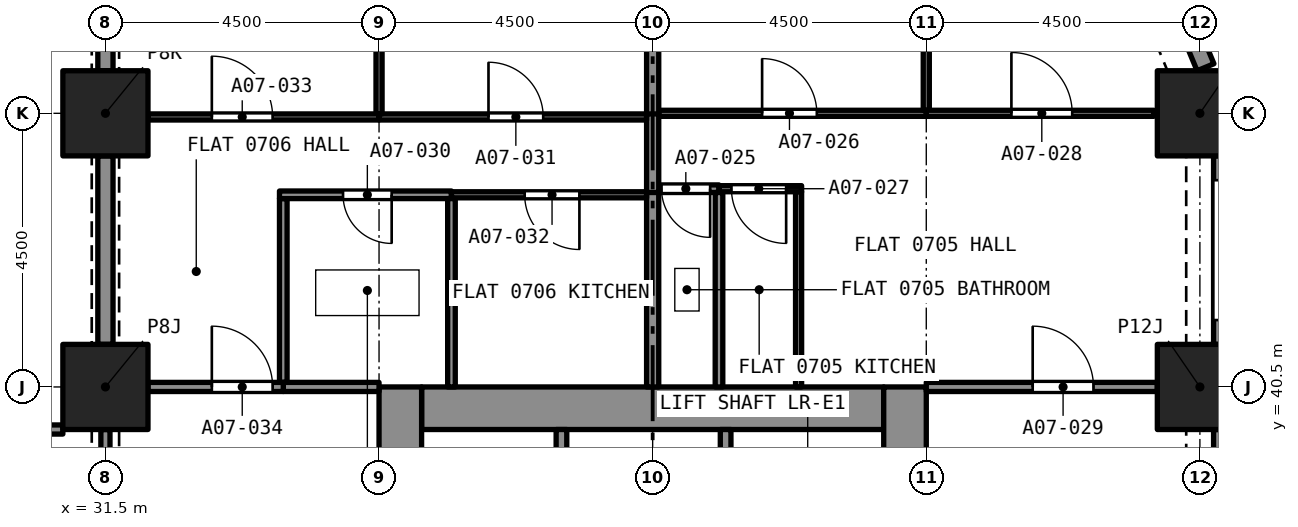
"""IFC4 building model, lengths in metres.
Left out: names, types, materials, properties, quantities, classifications, styles, units other than length and angle.
Written with IfcOpenShell. Run it as: python <this file> out.ifc"""

import sys

from ifc_helpers import new_model, si_unit, direction, frame, frame_2d, origin, origin_2d, place, context, subcontext, project, spatial, rectangle, extrude, element, fill, save


model = new_model("IFC4")
c1 = context("Model", 3, precision=1e-05, world=origin(), true_north=direction((0.0, 1.0)))
c2 = subcontext(c1, "Body", "Model", "MODEL_VIEW")
j1 = project(units=[si_unit("LENGTHUNIT", "METRE"), si_unit("PLANEANGLEUNIT", "RADIAN")], contexts=[c1])
p1 = place(None, origin())
s1 = spatial("IfcSite", under=j1, at=p1, CompositionType="ELEMENT")
p2 = place(p1, origin())
s2 = spatial("IfcBuilding", under=s1, at=p2, CompositionType="ELEMENT")
p3 = place(p2, frame((0.0, 0.0, 33.6)))
s3 = spatial("IfcBuildingStorey", under=s2, at=p3, CompositionType="ELEMENT", Elevation=33.6)
for number, where, z_axis, x_axis in (
    (1, (31.5, 40.5, 0.0), (0.0, 0.0, 1.0), (1.0, 0.0, 0.0)),
    (2, (49.5, 40.5, 0.0), (0.0, 0.0, 1.0), (1.0, 0.0, 0.0)),
    (3, (31.5, 45.0, 0.0), (0.0, 0.0, 1.0), (1.0, 0.0, 0.0)),
    (4, (49.5, 45.0, 0.0), (0.0, 0.0, 1.0), (1.0, 0.0, 0.0)),
):
    element("IfcColumn", number, at=place(p3, frame(where, z_axis=z_axis, x_axis=x_axis)), inside=s3, PredefinedType="COLUMN", context=c2, shape_type="SweptSolid", body=[
        extrude(rectangle(XDim=1.4, YDim=1.4, at=origin_2d()), origin(), (0.0, 0.0, 1.0), 3.2),
    ])
p4 = place(p3, frame((36.7, 40.15, 0.0), z_axis=(0.0, 0.0, 1.0), x_axis=(1.0, 0.0, 0.0)))
e5 = element("IfcWall", 5, at=p4, inside=s3, PredefinedType="SOLIDWALL", context=c2, shape_type="SweptSolid", body=[
    extrude(rectangle(XDim=7.6, YDim=0.7, at=frame_2d((3.8, 0.0))), origin(), (0.0, 0.0, 1.0), 3.2),
])
p5 = place(p3, frame((36.35, 27.0, 0.0), z_axis=(0.0, 0.0, 1.0), x_axis=(0.0, 1.0, 0.0)))
e6 = element("IfcWall", 6, at=p5, inside=s3, PredefinedType="SOLIDWALL", context=c2, shape_type="SweptSolid", body=[
    extrude(rectangle(XDim=13.5, YDim=0.7, at=frame_2d((6.75, 0.0))), origin(), (0.0, 0.0, 1.0), 3.2),
])
p6 = place(p5, frame((8.95, 0.0, 0.0)))
e7 = element("IfcOpeningElement", 7, at=p6, cuts=e6, PredefinedType="OPENING", context=c2, shape_type="SweptSolid", body=[
    extrude(rectangle(XDim=1.2, YDim=2.1, at=frame_2d((0.6, 1.05))), frame((0.0, 0.36, 0.0), z_axis=(0.0, -1.0, 0.0), x_axis=(1.0, 0.0, 0.0)), (0.0, 0.0, 1.0), 0.72),
])
p7 = place(p3, frame((44.65, 27.0, 0.0), z_axis=(0.0, 0.0, 1.0), x_axis=(0.0, 1.0, 0.0)))
e8 = element("IfcWall", 8, at=p7, inside=s3, PredefinedType="SOLIDWALL", context=c2, shape_type="SweptSolid", body=[
    extrude(rectangle(XDim=13.5, YDim=0.7, at=frame_2d((6.75, 0.0))), origin(), (0.0, 0.0, 1.0), 3.2),
])
p8 = place(p7, frame((8.95, 0.0, 0.0)))
e9 = element("IfcOpeningElement", 9, at=p8, cuts=e8, PredefinedType="OPENING", context=c2, shape_type="SweptSolid", body=[
    extrude(rectangle(XDim=1.2, YDim=2.1, at=frame_2d((0.6, 1.05))), frame((0.0, 0.36, 0.0), z_axis=(0.0, -1.0, 0.0), x_axis=(1.0, 0.0, 0.0)), (0.0, 0.0, 1.0), 0.72),
])
p9 = place(p3, frame((49.875, 39.8, 0.0), z_axis=(0.0, 0.0, 1.0), x_axis=(0.0, -1.0, 0.0)))
e10 = element("IfcWall", 10, at=p9, inside=s3, PredefinedType="SOLIDWALL", context=c2, shape_type="SweptSolid", body=[
    extrude(rectangle(XDim=3.1, YDim=0.3, at=frame_2d((1.55, 0.0))), origin(), (0.0, 0.0, 1.0), 3.2),
])
p10 = place(p9, frame((0.4, 0.0, 0.45)))
e11 = element("IfcOpeningElement", 11, at=p10, cuts=e10, PredefinedType="OPENING", context=c2, shape_type="SweptSolid", body=[
    extrude(rectangle(XDim=2.3, YDim=1.95, at=frame_2d((1.15, 0.975))), frame((0.0, 0.16, 0.0), z_axis=(0.0, -1.0, 0.0), x_axis=(1.0, 0.0, 0.0)), (0.0, 0.0, 1.0), 0.32),
])
p11 = place(p3, frame((49.875, 44.3, 0.0), z_axis=(0.0, 0.0, 1.0), x_axis=(0.0, -1.0, 0.0)))
e12 = element("IfcWall", 12, at=p11, inside=s3, PredefinedType="SOLIDWALL", context=c2, shape_type="SweptSolid", body=[
    extrude(rectangle(XDim=3.1, YDim=0.3, at=frame_2d((1.55, 0.0))), origin(), (0.0, 0.0, 1.0), 3.2),
])
p12 = place(p11, frame((0.4, 0.0, 0.45)))
e13 = element("IfcOpeningElement", 13, at=p12, cuts=e12, PredefinedType="OPENING", context=c2, shape_type="SweptSolid", body=[
    extrude(rectangle(XDim=2.3, YDim=1.95, at=frame_2d((1.15, 0.975))), frame((0.0, 0.16, 0.0), z_axis=(0.0, -1.0, 0.0), x_axis=(1.0, 0.0, 0.0)), (0.0, 0.0, 1.0), 0.32),
])
p13 = place(p3, frame((48.878, 47.48, 0.0), z_axis=(0.0, 0.0, 1.0), x_axis=(0.38262540684, -0.923903565336, 0.0)))
e14 = element("IfcWall", 14, at=p13, inside=s3, PredefinedType="SOLIDWALL", context=c2, shape_type="SweptSolid", body=[
    extrude(rectangle(XDim=1.865, YDim=0.3, at=frame_2d((0.933, 0.0))), origin(), (0.0, 0.0, 1.0), 3.2),
])
p14 = place(p13, frame((0.258, 0.0, 0.45)))
e15 = element("IfcOpeningElement", 15, at=p14, cuts=e14, PredefinedType="OPENING", context=c2, shape_type="SweptSolid", body=[
    extrude(rectangle(XDim=1.1, YDim=1.95, at=frame_2d((0.55, 0.975))), frame((0.0, 0.16, 0.0), z_axis=(0.0, -1.0, 0.0), x_axis=(1.0, 0.0, 0.0)), (0.0, 0.0, 1.0), 0.32),
])
p15 = place(p3, frame((41.591, 43.76, 0.0), z_axis=(0.0, 0.0, 1.0), x_axis=(-1.0, 0.0, 0.0)))
e16 = element("IfcWall", 16, at=p15, inside=s3, PredefinedType="PARTITIONING", context=c2, shape_type="SweptSolid", body=[
    extrude(rectangle(XDim=0.991, YDim=0.125, at=frame_2d((0.495, 0.0))), origin(), (0.0, 0.0, 1.0), 2.9),
])
p16 = place(p15, frame((0.146, 0.0, 0.0)))
e17 = element("IfcOpeningElement", 17, at=p16, cuts=e16, PredefinedType="OPENING", context=c2, shape_type="SweptSolid", body=[
    extrude(rectangle(XDim=0.8, YDim=2.1, at=frame_2d((0.4, 1.05))), frame((0.0, 0.073, 0.0), z_axis=(0.0, -1.0, 0.0), x_axis=(1.0, 0.0, 0.0)), (0.0, 0.0, 1.0), 0.145),
])
p17 = place(p3, frame((41.591, 40.5, 0.0), z_axis=(0.0, 0.0, 1.0), x_axis=(0.0, 1.0, 0.0)))
e18 = element("IfcWall", 18, at=p17, inside=s3, PredefinedType="PARTITIONING", context=c2, shape_type="SweptSolid", body=[
    extrude(rectangle(XDim=3.198, YDim=0.125, at=frame_2d((1.599, 0.0))), origin(), (0.0, 0.0, 1.0), 2.9),
])
p18 = place(p3, frame((40.5, 40.5, 0.0), z_axis=(0.0, 0.0, 1.0), x_axis=(0.0, 1.0, 0.0)))
e19 = element("IfcWall", 19, at=p18, inside=s3, PredefinedType="PARTITIONING", context=c2, shape_type="SweptSolid", body=[
    extrude(rectangle(XDim=3.21, YDim=0.2, at=frame_2d((1.605, 0.0))), origin(), (0.0, 0.0, 1.0), 2.9),
])
p19 = place(p3, frame((40.6, 45.0, 0.0), z_axis=(0.0, 0.0, 1.0), x_axis=(1.0, 0.0, 0.0)))
e20 = element("IfcWall", 20, at=p19, inside=s3, PredefinedType="PARTITIONING", context=c2, shape_type="SweptSolid", body=[
    extrude(rectangle(XDim=4.4, YDim=0.1, at=frame_2d((2.2, 0.0))), origin(), (0.0, 0.0, 1.0), 2.9),
])
p20 = place(p19, frame((1.7, 0.0, 0.0)))
e21 = element("IfcOpeningElement", 21, at=p20, cuts=e20, PredefinedType="OPENING", context=c2, shape_type="SweptSolid", body=[
    extrude(rectangle(XDim=0.9, YDim=2.1, at=frame_2d((0.45, 1.05))), frame((0.0, 0.06, 0.0), z_axis=(0.0, -1.0, 0.0), x_axis=(1.0, 0.0, 0.0)), (0.0, 0.0, 1.0), 0.12),
])
p21 = place(p3, frame((45.0, 45.05, 0.0), z_axis=(0.0, 0.0, 1.0), x_axis=(0.0, 1.0, 0.0)))
e22 = element("IfcWall", 22, at=p21, inside=s3, PredefinedType="PARTITIONING", context=c2, shape_type="SweptSolid", body=[
    extrude(rectangle(XDim=3.692, YDim=0.1, at=frame_2d((1.846, 0.0))), origin(), (0.0, 0.0, 1.0), 2.9),
])
p22 = place(p3, frame((40.5, 44.95, 0.0), z_axis=(0.0, 0.0, 1.0), x_axis=(0.0, 1.0, 0.0)))
e23 = element("IfcWall", 23, at=p22, inside=s3, PredefinedType="PARTITIONING", context=c2, shape_type="SweptSolid", body=[
    extrude(rectangle(XDim=3.85, YDim=0.2, at=frame_2d((1.925, 0.0))), origin(), (0.0, 0.0, 1.0), 2.9),
])
p23 = place(p3, frame((42.9, 40.5, 0.0), z_axis=(0.0, 0.0, 1.0), x_axis=(0.0, 1.0, 0.0)))
e24 = element("IfcWall", 24, at=p23, inside=s3, PredefinedType="PARTITIONING", context=c2, shape_type="SweptSolid", body=[
    extrude(rectangle(XDim=3.21, YDim=0.1, at=frame_2d((1.605, 0.0))), origin(), (0.0, 0.0, 1.0), 2.9),
])
p24 = place(p3, frame((42.95, 43.76, 0.0), z_axis=(0.0, 0.0, 1.0), x_axis=(-1.0, 0.0, 0.0)))
e25 = element("IfcWall", 25, at=p24, inside=s3, PredefinedType="PARTITIONING", context=c2, shape_type="SweptSolid", body=[
    extrude(rectangle(XDim=1.359, YDim=0.1, at=frame_2d((0.68, 0.0))), origin(), (0.0, 0.0, 1.0), 2.9),
])
p25 = place(p24, frame((0.254, 0.0, 0.0)))
e26 = element("IfcOpeningElement", 26, at=p25, cuts=e25, PredefinedType="OPENING", context=c2, shape_type="SweptSolid", body=[
    extrude(rectangle(XDim=0.9, YDim=2.1, at=frame_2d((0.45, 1.05))), frame((0.0, 0.06, 0.0), z_axis=(0.0, -1.0, 0.0), x_axis=(1.0, 0.0, 0.0)), (0.0, 0.0, 1.0), 0.12),
])
p26 = place(p3, frame((45.0, 45.0, 0.0), z_axis=(0.0, 0.0, 1.0), x_axis=(1.0, 0.0, 0.0)))
e27 = element("IfcWall", 27, at=p26, inside=s3, PredefinedType="PARTITIONING", context=c2, shape_type="SweptSolid", body=[
    extrude(rectangle(XDim=3.742, YDim=0.1, at=frame_2d((1.871, 0.0))), origin(), (0.0, 0.0, 1.0), 2.9),
])
p27 = place(p26, frame((1.4, 0.0, 0.0)))
e28 = element("IfcOpeningElement", 28, at=p27, cuts=e27, PredefinedType="OPENING", context=c2, shape_type="SweptSolid", body=[
    extrude(rectangle(XDim=1.0, YDim=2.1, at=frame_2d((0.5, 1.05))), frame((0.0, 0.06, 0.0), z_axis=(0.0, -1.0, 0.0), x_axis=(1.0, 0.0, 0.0)), (0.0, 0.0, 1.0), 0.12),
])
p28 = place(p3, frame((40.5, 43.698, 0.0), z_axis=(0.0, 0.0, 1.0), x_axis=(0.0, 1.0, 0.0)))
e29 = element("IfcWall", 29, at=p28, inside=s3, PredefinedType="PARTITIONING", context=c2, shape_type="SweptSolid", body=[
    extrude(rectangle(XDim=1.292, YDim=0.2, at=frame_2d((0.646, 0.0))), origin(), (0.0, 0.0, 1.0), 2.9),
])
p29 = place(p3, frame((45.0, 40.5, 0.0), z_axis=(0.0, 0.0, 1.0), x_axis=(1.0, 0.0, 0.0)))
e30 = element("IfcWall", 30, at=p29, inside=s3, PredefinedType="PARTITIONING", context=c2, shape_type="SweptSolid", body=[
    extrude(rectangle(XDim=3.8, YDim=0.15, at=frame_2d((1.9, 0.0))), origin(), (0.0, 0.0, 1.0), 2.9),
])
p30 = place(p29, frame((1.75, 0.0, 0.0)))
e31 = element("IfcOpeningElement", 31, at=p30, cuts=e30, PredefinedType="OPENING", context=c2, shape_type="SweptSolid", body=[
    extrude(rectangle(XDim=1.0, YDim=2.1, at=frame_2d((0.5, 1.05))), frame((0.0, 0.085, 0.0), z_axis=(0.0, -1.0, 0.0), x_axis=(1.0, 0.0, 0.0)), (0.0, 0.0, 1.0), 0.17),
])
p31 = place(p3, frame((34.425, 40.575, 0.0), z_axis=(0.0, 0.0, 1.0), x_axis=(0.0, 1.0, 0.0)))
e32 = element("IfcWall", 32, at=p31, inside=s3, PredefinedType="PARTITIONING", context=c2, shape_type="SweptSolid", body=[
    extrude(rectangle(XDim=3.022, YDim=0.125, at=frame_2d((1.511, 0.0))), origin(), (0.0, 0.0, 1.0), 2.9),
])
p32 = place(p3, frame((37.19, 43.66, 0.0), z_axis=(0.0, 0.0, 1.0), x_axis=(-1.0, 0.0, 0.0)))
e33 = element("IfcWall", 33, at=p32, inside=s3, PredefinedType="PARTITIONING", context=c2, shape_type="SweptSolid", body=[
    extrude(rectangle(XDim=2.828, YDim=0.125, at=frame_2d((1.414, 0.0))), origin(), (0.0, 0.0, 1.0), 2.9),
])
p33 = place(p32, frame((0.983, 0.0, 0.0)))
e34 = element("IfcOpeningElement", 34, at=p33, cuts=e33, PredefinedType="OPENING", context=c2, shape_type="SweptSolid", body=[
    extrude(rectangle(XDim=0.8, YDim=2.1, at=frame_2d((0.4, 1.05))), frame((0.0, 0.073, 0.0), z_axis=(0.0, -1.0, 0.0), x_axis=(1.0, 0.0, 0.0)), (0.0, 0.0, 1.0), 0.145),
])
p34 = place(p3, frame((37.191, 40.5, 0.0), z_axis=(0.0, 0.0, 1.0), x_axis=(0.0, 1.0, 0.0)))
e35 = element("IfcWall", 35, at=p34, inside=s3, PredefinedType="PARTITIONING", context=c2, shape_type="SweptSolid", body=[
    extrude(rectangle(XDim=3.097, YDim=0.125, at=frame_2d((1.549, 0.0))), origin(), (0.0, 0.0, 1.0), 2.9),
])
p35 = place(p3, frame((34.425, 40.5, 0.0), z_axis=(0.0, 0.0, 1.0), x_axis=(1.0, 0.0, 0.0)))
e36 = element("IfcWall", 36, at=p35, inside=s3, PredefinedType="PARTITIONING", context=c2, shape_type="SweptSolid", body=[
    extrude(rectangle(XDim=1.575, YDim=0.15, at=frame_2d((0.788, 0.0))), origin(), (0.0, 0.0, 1.0), 2.9),
])
p36 = place(p3, frame((36.0, 44.94, 0.0), z_axis=(0.0, 0.0, 1.0), x_axis=(1.0, 0.0, 0.0)))
e37 = element("IfcWall", 37, at=p36, inside=s3, PredefinedType="PARTITIONING", context=c2, shape_type="SweptSolid", body=[
    extrude(rectangle(XDim=4.4, YDim=0.1, at=frame_2d((2.2, 0.0))), origin(), (0.0, 0.0, 1.0), 2.9),
])
p37 = place(p36, frame((1.8, 0.0, 0.0)))
e38 = element("IfcOpeningElement", 38, at=p37, cuts=e37, PredefinedType="OPENING", context=c2, shape_type="SweptSolid", body=[
    extrude(rectangle(XDim=0.9, YDim=2.1, at=frame_2d((0.45, 1.05))), frame((0.0, 0.06, 0.0), z_axis=(0.0, -1.0, 0.0), x_axis=(1.0, 0.0, 0.0)), (0.0, 0.0, 1.0), 0.12),
])
p38 = place(p3, frame((36.0, 44.99, 0.0), z_axis=(0.0, 0.0, 1.0), x_axis=(0.0, 1.0, 0.0)))
e39 = element("IfcWall", 39, at=p38, inside=s3, PredefinedType="PARTITIONING", context=c2, shape_type="SweptSolid", body=[
    extrude(rectangle(XDim=3.81, YDim=0.1, at=frame_2d((1.905, 0.0))), origin(), (0.0, 0.0, 1.0), 2.9),
])
p39 = place(p3, frame((40.4, 43.66, 0.0), z_axis=(0.0, 0.0, 1.0), x_axis=(-1.0, 0.0, 0.0)))
e40 = element("IfcWall", 40, at=p39, inside=s3, PredefinedType="PARTITIONING", context=c2, shape_type="SweptSolid", body=[
    extrude(rectangle(XDim=3.209, YDim=0.1, at=frame_2d((1.605, 0.0))), origin(), (0.0, 0.0, 1.0), 2.9),
])
p40 = place(p39, frame((1.105, 0.0, 0.0)))
e41 = element("IfcOpeningElement", 41, at=p40, cuts=e40, PredefinedType="OPENING", context=c2, shape_type="SweptSolid", body=[
    extrude(rectangle(XDim=0.9, YDim=2.1, at=frame_2d((0.45, 1.05))), frame((0.0, 0.06, 0.0), z_axis=(0.0, -1.0, 0.0), x_axis=(1.0, 0.0, 0.0)), (0.0, 0.0, 1.0), 0.12),
])
p41 = place(p3, frame((32.2, 44.94, 0.0), z_axis=(0.0, 0.0, 1.0), x_axis=(1.0, 0.0, 0.0)))
e42 = element("IfcWall", 42, at=p41, inside=s3, PredefinedType="PARTITIONING", context=c2, shape_type="SweptSolid", body=[
    extrude(rectangle(XDim=3.8, YDim=0.1, at=frame_2d((1.9, 0.0))), origin(), (0.0, 0.0, 1.0), 2.9),
])
p42 = place(p41, frame((1.05, 0.0, 0.0)))
e43 = element("IfcOpeningElement", 43, at=p42, cuts=e42, PredefinedType="OPENING", context=c2, shape_type="SweptSolid", body=[
    extrude(rectangle(XDim=1.0, YDim=2.1, at=frame_2d((0.5, 1.05))), frame((0.0, 0.06, 0.0), z_axis=(0.0, -1.0, 0.0), x_axis=(1.0, 0.0, 0.0)), (0.0, 0.0, 1.0), 0.12),
])
p43 = place(p3, frame((31.5, 41.2, 0.0), z_axis=(0.0, 0.0, 1.0), x_axis=(0.0, 1.0, 0.0)))
e44 = element("IfcWall", 44, at=p43, inside=s3, PredefinedType="PARTITIONING", context=c2, shape_type="SweptSolid", body=[
    extrude(rectangle(XDim=3.1, YDim=0.25, at=frame_2d((1.55, 0.0))), origin(), (0.0, 0.0, 1.0), 2.38),
])
p44 = place(p3, frame((32.2, 40.5, 0.0), z_axis=(0.0, 0.0, 1.0), x_axis=(1.0, 0.0, 0.0)))
e45 = element("IfcWall", 45, at=p44, inside=s3, PredefinedType="PARTITIONING", context=c2, shape_type="SweptSolid", body=[
    extrude(rectangle(XDim=2.225, YDim=0.15, at=frame_2d((1.113, 0.0))), origin(), (0.0, 0.0, 1.0), 2.9),
])
p45 = place(p44, frame((1.05, 0.0, 0.0)))
e46 = element("IfcOpeningElement", 46, at=p45, cuts=e45, PredefinedType="OPENING", context=c2, shape_type="SweptSolid", body=[
    extrude(rectangle(XDim=1.0, YDim=2.1, at=frame_2d((0.5, 1.05))), frame((0.0, 0.085, 0.0), z_axis=(0.0, -1.0, 0.0), x_axis=(1.0, 0.0, 0.0)), (0.0, 0.0, 1.0), 0.17),
])
p46 = place(p3, frame((31.5, 45.7, 0.0), z_axis=(0.0, 0.0, 1.0), x_axis=(0.0, 1.0, 0.0)))
e47 = element("IfcWall", 47, at=p46, inside=s3, PredefinedType="PARTITIONING", context=c2, shape_type="SweptSolid", body=[
    extrude(rectangle(XDim=3.1, YDim=0.25, at=frame_2d((1.55, 0.0))), origin(), (0.0, 0.0, 1.0), 2.38),
])
p47 = place(p3, frame((18.7, 39.8, 0.0), z_axis=(0.0, 0.0, 1.0), x_axis=(1.0, 0.0, 0.0)))
e48 = element("IfcWall", 48, at=p47, inside=s3, PredefinedType="PARTITIONING", context=c2, shape_type="SweptSolid", body=[
    extrude(rectangle(XDim=12.1, YDim=0.15, at=frame_2d((6.05, 0.0))), origin(), (0.0, 0.0, 1.0), 2.75),
])
p48 = place(p47, frame((5.55, 0.0, 0.0)))
e49 = element("IfcOpeningElement", 49, at=p48, cuts=e48, PredefinedType="OPENING", context=c2, shape_type="SweptSolid", body=[
    extrude(rectangle(XDim=1.0, YDim=2.1, at=frame_2d((0.5, 1.05))), frame((0.0, 0.085, 0.0), z_axis=(0.0, -1.0, 0.0), x_axis=(1.0, 0.0, 0.0)), (0.0, 0.0, 1.0), 0.17),
])
p49 = place(p3, frame((31.5, 36.7, 0.0), z_axis=(0.0, 0.0, 1.0), x_axis=(0.0, 1.0, 0.0)))
e50 = element("IfcWall", 50, at=p49, inside=s3, PredefinedType="PARTITIONING", context=c2, shape_type="SweptSolid", body=[
    extrude(rectangle(XDim=3.1, YDim=0.15, at=frame_2d((1.55, 0.0))), origin(), (0.0, 0.0, 1.0), 2.38),
])
p50 = place(p49, frame((0.95, 0.0, 0.0)))
e51 = element("IfcOpeningElement", 51, at=p50, cuts=e50, PredefinedType="OPENING", context=c2, shape_type="SweptSolid", body=[
    extrude(rectangle(XDim=1.2, YDim=2.1, at=frame_2d((0.6, 1.05))), frame((0.0, 0.085, 0.0), z_axis=(0.0, -1.0, 0.0), x_axis=(1.0, 0.0, 0.0)), (0.0, 0.0, 1.0), 0.17),
])
for number, where, z_axis, x_axis in (
    (52, (41.7, 37.5, 0.0), (0.0, 0.0, 1.0), (0.0, 1.0, 0.0)),
    (53, (39.0, 37.5, 0.0), (0.0, 0.0, 1.0), (0.0, 1.0, 0.0)),
):
    element("IfcWall", number, at=place(p3, frame(where, z_axis=z_axis, x_axis=x_axis)), inside=s3, PredefinedType="SOLIDWALL", context=c2, shape_type="SweptSolid", body=[
        extrude(rectangle(XDim=2.3, YDim=0.175, at=frame_2d((1.15, 0.0))), origin(), (0.0, 0.0, 1.0), 2.9),
    ])
p51 = place(p16, origin())
e54 = element("IfcDoor", 54, at=p51, inside=s3, OperationType="SINGLE_SWING_RIGHT", PredefinedType="DOOR", context=c2, shape_type="SweptSolid", body=[
    extrude(rectangle(XDim=0.8, YDim=2.1, at=frame_2d((0.4, 1.05))), frame((0.0, 0.025, 0.0), z_axis=(0.0, -1.0, 0.0), x_axis=(1.0, 0.0, 0.0)), (0.0, 0.0, 1.0), 0.05),
])
fill(e17, e54)
p52 = place(p20, origin())
e55 = element("IfcDoor", 55, at=p52, inside=s3, OperationType="SINGLE_SWING_LEFT", PredefinedType="DOOR", context=c2, shape_type="SweptSolid", body=[
    extrude(rectangle(XDim=0.9, YDim=2.1, at=frame_2d((0.45, 1.05))), frame((0.0, 0.025, 0.0), z_axis=(0.0, -1.0, 0.0), x_axis=(1.0, 0.0, 0.0)), (0.0, 0.0, 1.0), 0.05),
])
fill(e21, e55)
p53 = place(p25, origin())
e56 = element("IfcDoor", 56, at=p53, inside=s3, OperationType="SINGLE_SWING_RIGHT", PredefinedType="DOOR", context=c2, shape_type="SweptSolid", body=[
    extrude(rectangle(XDim=0.9, YDim=2.1, at=frame_2d((0.45, 1.05))), frame((0.0, 0.025, 0.0), z_axis=(0.0, -1.0, 0.0), x_axis=(1.0, 0.0, 0.0)), (0.0, 0.0, 1.0), 0.05),
])
fill(e26, e56)
p54 = place(p27, origin())
e57 = element("IfcDoor", 57, at=p54, inside=s3, OperationType="SINGLE_SWING_RIGHT", PredefinedType="DOOR", context=c2, shape_type="SweptSolid", body=[
    extrude(rectangle(XDim=1.0, YDim=2.1, at=frame_2d((0.5, 1.05))), frame((0.0, 0.025, 0.0), z_axis=(0.0, -1.0, 0.0), x_axis=(1.0, 0.0, 0.0)), (0.0, 0.0, 1.0), 0.05),
])
fill(e28, e57)
p55 = place(p30, origin())
e58 = element("IfcDoor", 58, at=p55, inside=s3, OperationType="SINGLE_SWING_RIGHT", PredefinedType="DOOR", context=c2, shape_type="SweptSolid", body=[
    extrude(rectangle(XDim=1.0, YDim=2.1, at=frame_2d((0.5, 1.05))), frame((0.0, 0.025, 0.0), z_axis=(0.0, -1.0, 0.0), x_axis=(1.0, 0.0, 0.0)), (0.0, 0.0, 1.0), 0.05),
])
fill(e31, e58)
p56 = place(p33, origin())
e59 = element("IfcDoor", 59, at=p56, inside=s3, OperationType="SINGLE_SWING_LEFT", PredefinedType="DOOR", context=c2, shape_type="SweptSolid", body=[
    extrude(rectangle(XDim=0.8, YDim=2.1, at=frame_2d((0.4, 1.05))), frame((0.0, 0.025, 0.0), z_axis=(0.0, -1.0, 0.0), x_axis=(1.0, 0.0, 0.0)), (0.0, 0.0, 1.0), 0.05),
])
fill(e34, e59)
p57 = place(p37, origin())
e60 = element("IfcDoor", 60, at=p57, inside=s3, OperationType="SINGLE_SWING_RIGHT", PredefinedType="DOOR", context=c2, shape_type="SweptSolid", body=[
    extrude(rectangle(XDim=0.9, YDim=2.1, at=frame_2d((0.45, 1.05))), frame((0.0, 0.025, 0.0), z_axis=(0.0, -1.0, 0.0), x_axis=(1.0, 0.0, 0.0)), (0.0, 0.0, 1.0), 0.05),
])
fill(e38, e60)
p58 = place(p40, origin())
e61 = element("IfcDoor", 61, at=p58, inside=s3, OperationType="SINGLE_SWING_LEFT", PredefinedType="DOOR", context=c2, shape_type="SweptSolid", body=[
    extrude(rectangle(XDim=0.9, YDim=2.1, at=frame_2d((0.45, 1.05))), frame((0.0, 0.025, 0.0), z_axis=(0.0, -1.0, 0.0), x_axis=(1.0, 0.0, 0.0)), (0.0, 0.0, 1.0), 0.05),
])
fill(e41, e61)
p59 = place(p42, origin())
e62 = element("IfcDoor", 62, at=p59, inside=s3, OperationType="SINGLE_SWING_LEFT", PredefinedType="DOOR", context=c2, shape_type="SweptSolid", body=[
    extrude(rectangle(XDim=1.0, YDim=2.1, at=frame_2d((0.5, 1.05))), frame((0.0, 0.025, 0.0), z_axis=(0.0, -1.0, 0.0), x_axis=(1.0, 0.0, 0.0)), (0.0, 0.0, 1.0), 0.05),
])
fill(e43, e62)
p60 = place(p45, origin())
e63 = element("IfcDoor", 63, at=p60, inside=s3, OperationType="SINGLE_SWING_RIGHT", PredefinedType="DOOR", context=c2, shape_type="SweptSolid", body=[
    extrude(rectangle(XDim=1.0, YDim=2.1, at=frame_2d((0.5, 1.05))), frame((0.0, 0.025, 0.0), z_axis=(0.0, -1.0, 0.0), x_axis=(1.0, 0.0, 0.0)), (0.0, 0.0, 1.0), 0.05),
])
fill(e46, e63)
save(model, sys.argv[1])
